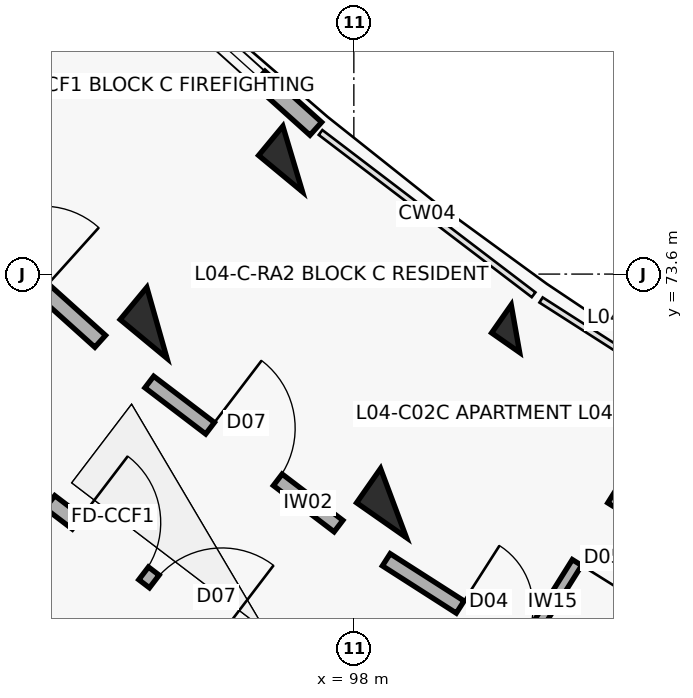
"""IFC4 building model, lengths in metres.
Left out: names, types, materials, properties, quantities, classifications, styles, units other than length and angle.
Written with IfcOpenShell. Run it as: python <this file> out.ifc"""

import sys

from ifc_helpers import new_model, si_unit, direction, frame, frame_2d, origin, origin_2d, place, context, subcontext, project, spatial, rectangle, extrude, element, fill, save


model = new_model("IFC4")
c1 = context("Model", 3, precision=1e-05, world=origin(), true_north=direction((0.0, 1.0)))
c2 = subcontext(c1, "Body", "Model", "MODEL_VIEW")
j1 = project(units=[si_unit("LENGTHUNIT", "METRE"), si_unit("PLANEANGLEUNIT", "RADIAN")], contexts=[c1])
p1 = place(None, origin())
s1 = spatial("IfcSite", under=j1, at=p1, CompositionType="ELEMENT")
p2 = place(p1, origin())
s2 = spatial("IfcBuilding", under=s1, at=p2, CompositionType="ELEMENT")
p3 = place(p2, frame((0.0, 0.0, 14.3)))
s3 = spatial("IfcBuildingStorey", under=s2, at=p3, CompositionType="ELEMENT", Elevation=14.3)
p4 = place(p3, frame((97.195, 75.115, 0.0), z_axis=(0.0, 0.0, 1.0), x_axis=(-0.637961754089, -0.770068049148, 0.0)))
e1 = element("IfcColumn", 1, at=p4, inside=s3, PredefinedType="COLUMN", context=c2, shape_type="SweptSolid", body=[
    extrude(rectangle(XDim=0.5, YDim=0.75, at=origin_2d()), origin(), (0.0, 0.0, 1.0), 3.1),
])
p5 = place(p3, frame((95.409, 72.958, 0.0), z_axis=(0.0, 0.0, 1.0), x_axis=(-0.637961754089, -0.770068049148, 0.0)))
e2 = element("IfcColumn", 2, at=p5, inside=s3, PredefinedType="COLUMN", context=c2, shape_type="SweptSolid", body=[
    extrude(rectangle(XDim=0.55, YDim=0.8, at=origin_2d()), origin(), (0.0, 0.0, 1.0), 3.1),
])
p6 = place(p3, frame((100.126, 72.882, 0.0), z_axis=(0.0, 0.0, 1.0), x_axis=(-0.573004420611, -0.819552276527, 0.0)))
e3 = element("IfcColumn", 3, at=p6, inside=s3, PredefinedType="COLUMN", context=c2, shape_type="SweptSolid", body=[
    extrude(rectangle(XDim=0.45, YDim=0.45, at=origin_2d()), origin(), (0.0, 0.0, 1.0), 3.1),
])
p7 = place(p3, frame((98.522, 70.587, 0.0), z_axis=(0.0, 0.0, 1.0), x_axis=(-0.573004420611, -0.819552276527, 0.0)))
e4 = element("IfcColumn", 4, at=p7, inside=s3, PredefinedType="COLUMN", context=c2, shape_type="SweptSolid", body=[
    extrude(rectangle(XDim=0.55, YDim=0.8, at=origin_2d()), origin(), (0.0, 0.0, 1.0), 3.1),
])
p8 = place(p3, frame((94.82, 77.923, 0.0), z_axis=(0.0, 0.0, 1.0), x_axis=(0.743385092197, -0.668863666751, 0.0)))
e5 = element("IfcWall", 5, at=p8, inside=s3, PredefinedType="SOLIDWALL", context=c2, shape_type="SweptSolid", body=[
    extrude(rectangle(XDim=3.604, YDim=0.23, at=frame_2d((1.802, 0.0))), origin(), (0.0, 0.0, 1.0), 2.25),
])
p9 = place(p8, frame((1.002, 0.0, 0.32)))
e6 = element("IfcOpeningElement", 6, at=p9, cuts=e5, PredefinedType="OPENING", context=c2, shape_type="SweptSolid", body=[
    extrude(rectangle(XDim=1.6, YDim=1.5, at=frame_2d((0.8, 0.75))), frame((0.0, 0.125, 0.0), z_axis=(0.0, -1.0, 0.0), x_axis=(1.0, 0.0, 0.0)), (0.0, 0.0, 1.0), 0.25),
])
p10 = place(p3, frame((92.337, 74.808, 0.0), z_axis=(0.0, 0.0, 1.0), x_axis=(0.743348465558, -0.668904371904, 0.0)))
e7 = element("IfcWall", 7, at=p10, inside=s3, PredefinedType="SOLIDWALL", context=c2, shape_type="SweptSolid", body=[
    extrude(rectangle(XDim=3.129, YDim=0.21, at=frame_2d((1.564, 0.0))), origin(), (0.0, 0.0, 1.0), 2.08),
])
p11 = place(p10, frame((1.014, 0.0, 0.0)))
e8 = element("IfcOpeningElement", 8, at=p11, cuts=e7, PredefinedType="OPENING", context=c2, shape_type="SweptSolid", body=[
    extrude(rectangle(XDim=1.1, YDim=2.15, at=frame_2d((0.55, 1.075))), frame((0.0, 0.115, 0.0), z_axis=(0.0, -1.0, 0.0), x_axis=(1.0, 0.0, 0.0)), (0.0, 0.0, 1.0), 0.23),
])
p12 = place(p3, frame((94.001, 70.602, 0.0), z_axis=(0.0, 0.0, 1.0), x_axis=(0.795498026433, -0.605956178235, 0.0)))
e9 = element("IfcWall", 9, at=p12, inside=s3, PredefinedType="SOLIDWALL", context=c2, shape_type="SweptSolid", body=[
    extrude(rectangle(XDim=3.296, YDim=0.21, at=frame_2d((1.648, 0.0))), origin(), (0.0, 0.0, 1.0), 2.08),
])
p13 = place(p12, frame((0.45, 0.0, 0.0)))
e10 = element("IfcOpeningElement", 10, at=p13, cuts=e9, PredefinedType="OPENING", context=c2, shape_type="SweptSolid", body=[
    extrude(rectangle(XDim=1.1, YDim=2.15, at=frame_2d((0.55, 1.075))), frame((0.0, 0.115, 0.0), z_axis=(0.0, -1.0, 0.0), x_axis=(1.0, 0.0, 0.0)), (0.0, 0.0, 1.0), 0.23),
])
p14 = place(p12, frame((1.726, 0.0, 0.0)))
e11 = element("IfcOpeningElement", 11, at=p14, cuts=e9, PredefinedType="OPENING", context=c2, shape_type="SweptSolid", body=[
    extrude(rectangle(XDim=1.12, YDim=2.15, at=frame_2d((0.56, 1.075))), frame((0.0, 0.115, 0.0), z_axis=(0.0, -1.0, 0.0), x_axis=(1.0, 0.0, 0.0)), (0.0, 0.0, 1.0), 0.23),
])
p15 = place(p3, frame((95.309, 72.18, 0.0), z_axis=(0.0, 0.0, 1.0), x_axis=(0.795463961918, -0.606000895453, 0.0)))
e12 = element("IfcWall", 12, at=p15, inside=s3, PredefinedType="SOLIDWALL", context=c2, shape_type="SweptSolid", body=[
    extrude(rectangle(XDim=3.129, YDim=0.19, at=frame_2d((1.564, 0.0))), origin(), (0.0, 0.0, 1.0), 2.08),
])
p16 = place(p15, frame((1.004, 0.0, 0.0)))
e13 = element("IfcOpeningElement", 13, at=p16, cuts=e12, PredefinedType="OPENING", context=c2, shape_type="SweptSolid", body=[
    extrude(rectangle(XDim=1.12, YDim=2.15, at=frame_2d((0.56, 1.075))), frame((0.0, 0.105, 0.0), z_axis=(0.0, -1.0, 0.0), x_axis=(1.0, 0.0, 0.0)), (0.0, 0.0, 1.0), 0.21),
])
p17 = place(p3, frame((98.427, 69.841, 0.0), z_axis=(0.0, 0.0, 1.0), x_axis=(0.842280895761, -0.539038860043, 0.0)))
e14 = element("IfcWall", 14, at=p17, inside=s3, PredefinedType="SOLIDWALL", context=c2, shape_type="SweptSolid", body=[
    extrude(rectangle(XDim=3.269, YDim=0.19, at=frame_2d((1.634, 0.0))), origin(), (0.0, 0.0, 1.0), 2.08),
])
p18 = place(p17, frame((1.154, 0.0, 0.0)))
e15 = element("IfcOpeningElement", 15, at=p18, cuts=e14, PredefinedType="OPENING", context=c2, shape_type="SweptSolid", body=[
    extrude(rectangle(XDim=0.96, YDim=2.1, at=frame_2d((0.48, 1.05))), frame((0.0, 0.105, 0.0), z_axis=(0.0, -1.0, 0.0), x_axis=(1.0, 0.0, 0.0)), (0.0, 0.0, 1.0), 0.21),
])
p19 = place(p3, frame((102.044, 71.577, 0.0), z_axis=(0.0, 0.0, 1.0), x_axis=(-0.53015188203, -0.847902696057, 0.0)))
e16 = element("IfcWall", 16, at=p19, inside=s3, PredefinedType="PARTITIONING", context=c2, shape_type="SweptSolid", body=[
    extrude(rectangle(XDim=3.3, YDim=0.145, at=frame_2d((1.65, 0.0))), origin(), (0.0, 0.0, 1.0), 2.08),
])
p20 = place(p19, frame((1.21, 0.0, 0.0)))
e17 = element("IfcOpeningElement", 17, at=p20, cuts=e16, PredefinedType="OPENING", context=c2, shape_type="SweptSolid", body=[
    extrude(rectangle(XDim=0.88, YDim=2.1, at=frame_2d((0.44, 1.05))), frame((0.0, 0.083, 0.0), z_axis=(0.0, -1.0, 0.0), x_axis=(1.0, 0.0, 0.0)), (0.0, 0.0, 1.0), 0.165),
])
p21 = place(p9, origin())
e18 = element("IfcWindow", 18, at=p21, inside=s3, PartitioningType="DOUBLE_PANEL_VERTICAL", PredefinedType="WINDOW", context=c2, shape_type="SweptSolid", body=[
    extrude(rectangle(XDim=1.6, YDim=1.5, at=frame_2d((0.8, 0.75))), frame((0.0, 0.03, 0.0), z_axis=(0.0, -1.0, 0.0), x_axis=(1.0, 0.0, 0.0)), (0.0, 0.0, 1.0), 0.06),
])
fill(e6, e18)
p22 = place(p13, origin())
e19 = element("IfcDoor", 19, at=p22, inside=s3, OperationType="SINGLE_SWING_LEFT", PredefinedType="DOOR", context=c2, shape_type="SweptSolid", body=[
    extrude(rectangle(XDim=1.1, YDim=2.15, at=frame_2d((0.55, 1.075))), frame((0.0, 0.025, 0.0), z_axis=(0.0, -1.0, 0.0), x_axis=(1.0, 0.0, 0.0)), (0.0, 0.0, 1.0), 0.05),
])
fill(e10, e19)
p23 = place(p14, origin())
e20 = element("IfcDoor", 20, at=p23, inside=s3, OperationType="SINGLE_SWING_RIGHT", PredefinedType="DOOR", context=c2, shape_type="SweptSolid", body=[
    extrude(rectangle(XDim=1.12, YDim=2.15, at=frame_2d((0.56, 1.075))), frame((0.0, 0.025, 0.0), z_axis=(0.0, -1.0, 0.0), x_axis=(1.0, 0.0, 0.0)), (0.0, 0.0, 1.0), 0.05),
])
fill(e11, e20)
p24 = place(p16, origin())
e21 = element("IfcDoor", 21, at=p24, inside=s3, OperationType="SINGLE_SWING_LEFT", PredefinedType="DOOR", context=c2, shape_type="SweptSolid", body=[
    extrude(rectangle(XDim=1.12, YDim=2.15, at=frame_2d((0.56, 1.075))), frame((0.0, 0.025, 0.0), z_axis=(0.0, -1.0, 0.0), x_axis=(1.0, 0.0, 0.0)), (0.0, 0.0, 1.0), 0.05),
])
fill(e13, e21)
p25 = place(p18, origin())
e22 = element("IfcDoor", 22, at=p25, inside=s3, OperationType="SINGLE_SWING_LEFT", PredefinedType="DOOR", context=c2, shape_type="SweptSolid", body=[
    extrude(rectangle(XDim=0.96, YDim=2.1, at=frame_2d((0.48, 1.05))), frame((0.0, 0.025, 0.0), z_axis=(0.0, -1.0, 0.0), x_axis=(1.0, 0.0, 0.0)), (0.0, 0.0, 1.0), 0.05),
])
fill(e15, e22)
p26 = place(p20, origin())
e23 = element("IfcDoor", 23, at=p26, inside=s3, OperationType="SINGLE_SWING_RIGHT", PredefinedType="DOOR", context=c2, shape_type="SweptSolid", body=[
    extrude(rectangle(XDim=0.88, YDim=2.1, at=frame_2d((0.44, 1.05))), frame((0.0, 0.025, 0.0), z_axis=(0.0, -1.0, 0.0), x_axis=(1.0, 0.0, 0.0)), (0.0, 0.0, 1.0), 0.05),
])
fill(e17, e23)
save(model, sys.argv[1])
